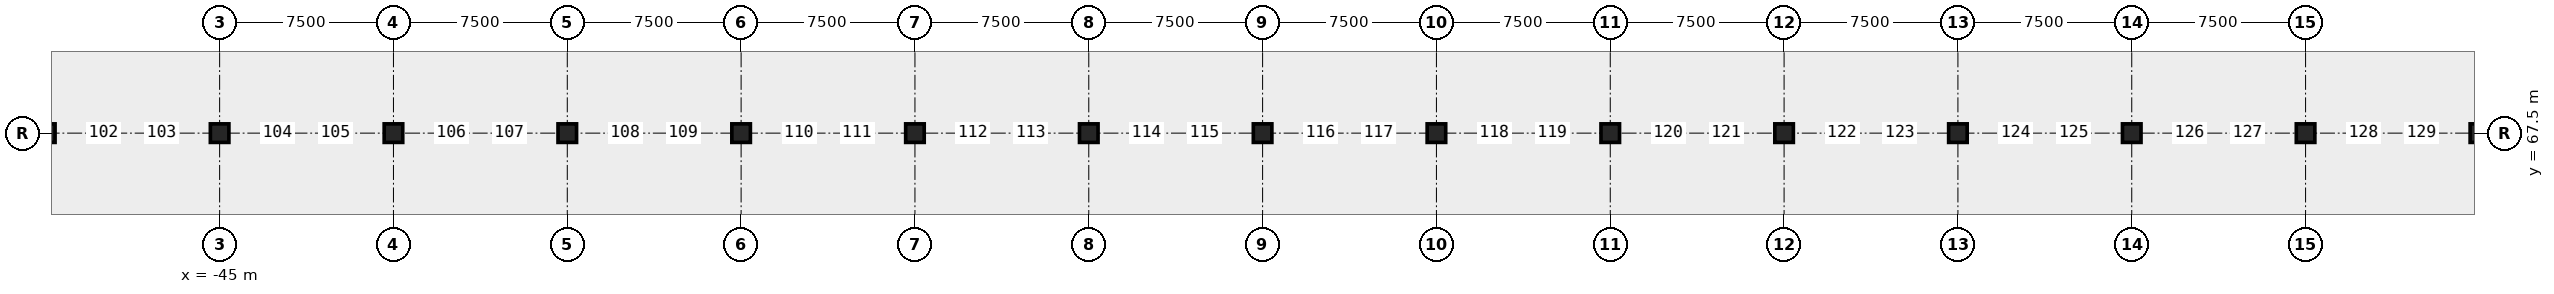
"""IFC4 building model, lengths in metres.
Left out: names, types, materials, properties, quantities, classifications, styles, units other than length and angle.
Written with IfcOpenShell. Run it as: python <this file> out.ifc"""

import sys

from ifc_helpers import new_model, si_unit, direction, frame, origin, origin_2d, place, context, subcontext, project, spatial, rectangle, extrude, element, save


model = new_model("IFC4")
c1 = context("Model", 3, precision=1e-05, world=origin(), true_north=direction((0.0, 1.0)))
c2 = subcontext(c1, "Body", "Model", "MODEL_VIEW")
j1 = project(units=[si_unit("LENGTHUNIT", "METRE"), si_unit("PLANEANGLEUNIT", "RADIAN")], contexts=[c1])
p1 = place(None, origin())
s1 = spatial("IfcSite", under=j1, at=p1, CompositionType="ELEMENT")
p2 = place(p1, origin())
s2 = spatial("IfcBuilding", under=s1, at=p2, CompositionType="ELEMENT")
p3 = place(p2, frame((0.0, 0.0, -16.5)))
s3 = spatial("IfcBuildingStorey", under=s2, at=p3, CompositionType="ELEMENT", Elevation=-16.5)
for number, where, z_axis, x_axis in (
    (1, (-52.5, 67.5, -0.4), (0.0, 0.0, 1.0), (1.0, 0.0, 0.0)),
    (2, (-45.0, 67.5, -0.4), (0.0, 0.0, 1.0), (1.0, 0.0, 0.0)),
    (3, (-37.5, 67.5, -0.4), (0.0, 0.0, 1.0), (1.0, 0.0, 0.0)),
    (4, (-30.0, 67.5, -0.4), (0.0, 0.0, 1.0), (1.0, 0.0, 0.0)),
    (5, (-22.5, 67.5, -0.4), (0.0, 0.0, 1.0), (1.0, 0.0, 0.0)),
    (6, (-15.0, 67.5, -0.4), (0.0, 0.0, 1.0), (1.0, 0.0, 0.0)),
    (7, (-7.5, 67.5, -0.4), (0.0, 0.0, 1.0), (1.0, 0.0, 0.0)),
    (8, (0.0, 67.5, -0.4), (0.0, 0.0, 1.0), (1.0, 0.0, 0.0)),
    (9, (7.5, 67.5, -0.4), (0.0, 0.0, 1.0), (1.0, 0.0, 0.0)),
    (10, (15.0, 67.5, -0.4), (0.0, 0.0, 1.0), (1.0, 0.0, 0.0)),
    (11, (22.5, 67.5, -0.4), (0.0, 0.0, 1.0), (1.0, 0.0, 0.0)),
    (12, (30.0, 67.5, -0.4), (0.0, 0.0, 1.0), (1.0, 0.0, 0.0)),
    (13, (37.5, 67.5, -0.4), (0.0, 0.0, 1.0), (1.0, 0.0, 0.0)),
    (14, (45.0, 67.5, -0.4), (0.0, 0.0, 1.0), (1.0, 0.0, 0.0)),
    (15, (52.5, 67.5, -0.4), (0.0, 0.0, 1.0), (1.0, 0.0, 0.0)),
):
    element("IfcColumn", number, at=place(p3, frame(where, z_axis=z_axis, x_axis=x_axis)), inside=s3, PredefinedType="COLUMN", context=c2, shape_type="SweptSolid", body=[
        extrude(rectangle(XDim=0.8, YDim=0.8, at=origin_2d()), origin(), (0.0, 0.0, 1.0), 5.48),
    ])
save(model, sys.argv[1])
